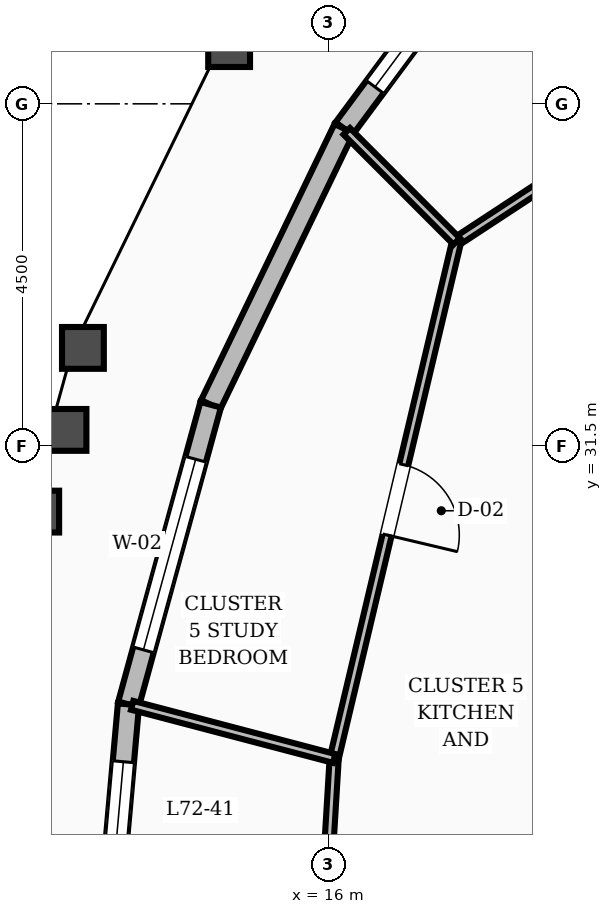
"""IFC4 building model, lengths in metres.
Left out: names, types, materials, properties, quantities, classifications, styles, units other than length and angle.
Written with IfcOpenShell. Run it as: python <this file> out.ifc"""

import sys

from ifc_helpers import new_model, si_unit, direction, frame, frame_2d, origin, place, context, subcontext, project, spatial, rectangle, extrude, element, fill, save


model = new_model("IFC4")
c1 = context("Model", 3, precision=1e-05, world=origin(), true_north=direction((0.0, 1.0)))
c2 = subcontext(c1, "Body", "Model", "MODEL_VIEW")
j1 = project(units=[si_unit("LENGTHUNIT", "METRE"), si_unit("PLANEANGLEUNIT", "RADIAN")], contexts=[c1])
p1 = place(None, origin())
s1 = spatial("IfcSite", under=j1, at=p1, CompositionType="ELEMENT")
p2 = place(p1, origin())
s2 = spatial("IfcBuilding", under=s1, at=p2, CompositionType="ELEMENT")
p3 = place(p2, frame((0.0, 0.0, 276.0)))
s3 = spatial("IfcBuildingStorey", under=s2, at=p3, CompositionType="ELEMENT", Elevation=276.0)
p4 = place(p3, frame((18.569, 38.858, 0.0), z_axis=(0.0, 0.0, 1.0), x_axis=(-0.595834112452, -0.803107533546, 0.0)))
e1 = element("IfcWall", 1, at=p4, inside=s3, PredefinedType="STANDARD", context=c2, shape_type="SweptSolid", body=[
    extrude(rectangle(XDim=3.965, YDim=0.28, at=frame_2d((1.982, 0.0))), origin(), (0.0, 0.0, 1.0), 2.88),
])
p5 = place(p4, frame((0.682, 0.0, 0.8)))
e2 = element("IfcOpeningElement", 2, at=p5, cuts=e1, PredefinedType="OPENING", context=c2, shape_type="SweptSolid", body=[
    extrude(rectangle(XDim=2.6, YDim=1.65, at=frame_2d((1.3, 0.825))), frame((0.0, 0.15, 0.0), z_axis=(0.0, -1.0, 0.0), x_axis=(1.0, 0.0, 0.0)), (0.0, 0.0, 1.0), 0.3),
])
p6 = place(p3, frame((16.206, 35.674, 0.0), z_axis=(0.0, 0.0, 1.0), x_axis=(-0.435070554904, -0.900396363973, 0.0)))
e3 = element("IfcWall", 3, at=p6, inside=s3, PredefinedType="STANDARD", context=c2, shape_type="SweptSolid", body=[
    extrude(rectangle(XDim=4.035, YDim=0.28, at=frame_2d((2.017, 0.0))), origin(), (0.0, 0.0, 1.0), 2.88),
])
p7 = place(p3, frame((14.451, 32.041, 0.0), z_axis=(0.0, 0.0, 1.0), x_axis=(-0.264426176781, -0.964405929592, 0.0)))
e4 = element("IfcWall", 4, at=p7, inside=s3, PredefinedType="STANDARD", context=c2, shape_type="SweptSolid", body=[
    extrude(rectangle(XDim=4.087, YDim=0.28, at=frame_2d((2.044, 0.0))), origin(), (0.0, 0.0, 1.0), 2.88),
])
p8 = place(p7, frame((0.744, 0.0, 0.8)))
e5 = element("IfcOpeningElement", 5, at=p8, cuts=e4, PredefinedType="OPENING", context=c2, shape_type="SweptSolid", body=[
    extrude(rectangle(XDim=2.6, YDim=1.65, at=frame_2d((1.3, 0.825))), frame((0.0, 0.15, 0.0), z_axis=(0.0, -1.0, 0.0), x_axis=(1.0, 0.0, 0.0)), (0.0, 0.0, 1.0), 0.3),
])
p9 = place(p3, frame((13.37, 28.099, 0.0), z_axis=(0.0, 0.0, 1.0), x_axis=(-0.08868496751, -0.996059725387, 0.0)))
e6 = element("IfcWall", 6, at=p9, inside=s3, PredefinedType="STANDARD", context=c2, shape_type="SweptSolid", body=[
    extrude(rectangle(XDim=4.115, YDim=0.28, at=frame_2d((2.058, 0.0))), origin(), (0.0, 0.0, 1.0), 2.88),
])
p10 = place(p9, frame((0.758, 0.0, 0.8)))
e7 = element("IfcOpeningElement", 7, at=p10, cuts=e6, PredefinedType="OPENING", context=c2, shape_type="SweptSolid", body=[
    extrude(rectangle(XDim=2.6, YDim=1.65, at=frame_2d((1.3, 0.825))), frame((0.0, 0.15, 0.0), z_axis=(0.0, -1.0, 0.0), x_axis=(1.0, 0.0, 0.0)), (0.0, 0.0, 1.0), 0.3),
])
p11 = place(p3, frame((23.341, 37.898, 0.0), z_axis=(0.0, 0.0, 1.0), x_axis=(-0.836259569514, -0.548333778274, 0.0)))
e8 = element("IfcWall", 8, at=p11, inside=s3, PredefinedType="PARTITIONING", context=c2, shape_type="SweptSolid", body=[
    extrude(rectangle(XDim=6.76, YDim=0.12, at=frame_2d((3.38, 0.0))), origin(), (0.0, 0.0, 1.0), 2.87),
])
p12 = place(p11, frame((3.99, 0.0, 0.0)))
e9 = element("IfcOpeningElement", 9, at=p12, cuts=e8, PredefinedType="OPENING", context=c2, shape_type="SweptSolid", body=[
    extrude(rectangle(XDim=0.95, YDim=2.1, at=frame_2d((0.475, 1.05))), frame((0.0, 0.07, 0.0), z_axis=(0.0, -1.0, 0.0), x_axis=(1.0, 0.0, 0.0)), (0.0, 0.0, 1.0), 0.14),
])
p13 = place(p3, frame((17.688, 34.191, 0.0), z_axis=(0.0, 0.0, 1.0), x_axis=(-0.230512502036, -0.973069363615, 0.0)))
e10 = element("IfcWall", 10, at=p13, inside=s3, PredefinedType="PARTITIONING", context=c2, shape_type="SweptSolid", body=[
    extrude(rectangle(XDim=6.991, YDim=0.12, at=frame_2d((3.496, 0.0))), origin(), (0.0, 0.0, 1.0), 2.87),
])
p14 = place(p13, frame((3.021, 0.0, 0.0)))
e11 = element("IfcOpeningElement", 11, at=p14, cuts=e10, PredefinedType="OPENING", context=c2, shape_type="SweptSolid", body=[
    extrude(rectangle(XDim=0.95, YDim=2.1, at=frame_2d((0.475, 1.05))), frame((0.0, 0.07, 0.0), z_axis=(0.0, -1.0, 0.0), x_axis=(1.0, 0.0, 0.0)), (0.0, 0.0, 1.0), 0.14),
])
p15 = place(p3, frame((17.688, 34.191, 0.0), z_axis=(0.0, 0.0, 1.0), x_axis=(-0.706689063462, 0.707524252293, 0.0)))
e12 = element("IfcWall", 12, at=p15, inside=s3, PredefinedType="PARTITIONING", context=c2, shape_type="SweptSolid", body=[
    extrude(rectangle(XDim=2.046, YDim=0.12, at=frame_2d((1.023, 0.0))), origin(), (0.0, 0.0, 1.0), 2.87),
])
p16 = place(p3, frame((16.076, 27.388, 0.0), z_axis=(0.0, 0.0, 1.0), x_axis=(-0.060277885003, -0.998181635064, 0.0)))
e13 = element("IfcWall", 13, at=p16, inside=s3, PredefinedType="PARTITIONING", context=c2, shape_type="SweptSolid", body=[
    extrude(rectangle(XDim=3.394, YDim=0.12, at=frame_2d((1.697, 0.0))), origin(), (0.0, 0.0, 1.0), 2.87),
])
p17 = place(p16, frame((1.222, 0.0, 0.0)))
e14 = element("IfcOpeningElement", 14, at=p17, cuts=e13, PredefinedType="OPENING", context=c2, shape_type="SweptSolid", body=[
    extrude(rectangle(XDim=0.95, YDim=2.1, at=frame_2d((0.475, 1.05))), frame((0.0, 0.07, 0.0), z_axis=(0.0, -1.0, 0.0), x_axis=(1.0, 0.0, 0.0)), (0.0, 0.0, 1.0), 0.14),
])
p18 = place(p3, frame((16.076, 27.388, 0.0), z_axis=(0.0, 0.0, 1.0), x_axis=(-0.96713435231, 0.25426589347, 0.0)))
e15 = element("IfcWall", 15, at=p18, inside=s3, PredefinedType="PARTITIONING", context=c2, shape_type="SweptSolid", body=[
    extrude(rectangle(XDim=2.748, YDim=0.12, at=frame_2d((1.374, 0.0))), origin(), (0.0, 0.0, 1.0), 2.87),
])
p19 = place(p5, origin())
e16 = element("IfcWindow", 16, at=p19, inside=s3, PartitioningType="SINGLE_PANEL", PredefinedType="WINDOW", context=c2, shape_type="SweptSolid", body=[
    extrude(rectangle(XDim=2.6, YDim=1.65, at=frame_2d((1.3, 0.825))), frame((0.0, 0.03, 0.0), z_axis=(0.0, -1.0, 0.0), x_axis=(1.0, 0.0, 0.0)), (0.0, 0.0, 1.0), 0.06),
])
fill(e2, e16)
p20 = place(p8, origin())
e17 = element("IfcWindow", 17, at=p20, inside=s3, PartitioningType="SINGLE_PANEL", PredefinedType="WINDOW", context=c2, shape_type="SweptSolid", body=[
    extrude(rectangle(XDim=2.6, YDim=1.65, at=frame_2d((1.3, 0.825))), frame((0.0, 0.03, 0.0), z_axis=(0.0, -1.0, 0.0), x_axis=(1.0, 0.0, 0.0)), (0.0, 0.0, 1.0), 0.06),
])
fill(e5, e17)
p21 = place(p10, origin())
e18 = element("IfcWindow", 18, at=p21, inside=s3, PartitioningType="SINGLE_PANEL", PredefinedType="WINDOW", context=c2, shape_type="SweptSolid", body=[
    extrude(rectangle(XDim=2.6, YDim=1.65, at=frame_2d((1.3, 0.825))), frame((0.0, 0.03, 0.0), z_axis=(0.0, -1.0, 0.0), x_axis=(1.0, 0.0, 0.0)), (0.0, 0.0, 1.0), 0.06),
])
fill(e7, e18)
p22 = place(p14, origin())
e19 = element("IfcDoor", 19, at=p22, inside=s3, OperationType="SINGLE_SWING_RIGHT", PredefinedType="DOOR", context=c2, shape_type="SweptSolid", body=[
    extrude(rectangle(XDim=0.95, YDim=2.1, at=frame_2d((0.475, 1.05))), frame((0.0, 0.025, 0.0), z_axis=(0.0, -1.0, 0.0), x_axis=(1.0, 0.0, 0.0)), (0.0, 0.0, 1.0), 0.05),
])
fill(e11, e19)
save(model, sys.argv[1])
